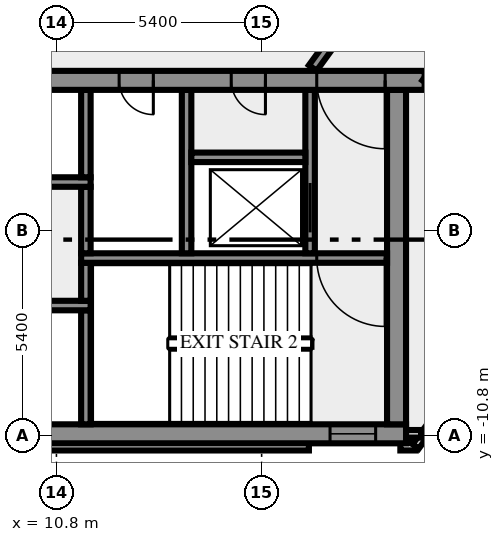
"""IFC4 building model, lengths in metres.
Left out: names, types, materials, properties, quantities, classifications, styles, units other than length and angle.
Written with IfcOpenShell. Run it as: python <this file> out.ifc"""

import sys

from ifc_helpers import new_model, si_unit, direction, frame, frame_2d, origin, place, context, subcontext, project, spatial, rectangle, extrude, element, fill, save


model = new_model("IFC4")
c1 = context("Model", 3, precision=1e-05, world=origin(), true_north=direction((0.0, 1.0)))
c2 = subcontext(c1, "Body", "Model", "MODEL_VIEW")
j1 = project(units=[si_unit("LENGTHUNIT", "METRE"), si_unit("PLANEANGLEUNIT", "RADIAN")], contexts=[c1])
p1 = place(None, origin())
s1 = spatial("IfcSite", under=j1, at=p1, CompositionType="ELEMENT")
p2 = place(p1, origin())
s2 = spatial("IfcBuilding", under=s1, at=p2, CompositionType="ELEMENT")
p3 = place(p2, frame((0.0, 0.0, 20.5)))
s3 = spatial("IfcBuildingStorey", under=s2, at=p3, CompositionType="ELEMENT", Elevation=20.5)
p4 = place(p3, frame((-17.444, -11.088, 0.0), z_axis=(0.0, 0.0, 1.0), x_axis=(1.0, 0.0, 0.0)))
e1 = element("IfcWall", 1, at=p4, inside=s3, PredefinedType="SOLIDWALL", context=c2, shape_type="SweptSolid", body=[
    extrude(rectangle(XDim=34.888, YDim=0.2, at=frame_2d((17.444, 0.0))), origin(), (0.0, 0.0, 1.0), 3.9),
])
p5 = place(p3, frame((19.85, -11.088, 0.0), z_axis=(0.0, 0.0, 1.0), x_axis=(1.0, 0.0, 0.0)))
e2 = element("IfcWall", 2, at=p5, inside=s3, PredefinedType="SOLIDWALL", context=c2, shape_type="SweptSolid", body=[
    extrude(rectangle(XDim=0.406, YDim=0.2, at=frame_2d((0.203, 0.0))), origin(), (0.0, 0.0, 1.0), 3.9),
])
p6 = place(p3, frame((20.253, -11.083, 0.0), z_axis=(0.0, 0.0, 1.0), x_axis=(0.587766567315, 0.809030569476, 0.0)))
e3 = element("IfcWall", 3, at=p6, inside=s3, PredefinedType="SOLIDWALL", context=c2, shape_type="SweptSolid", body=[
    extrude(rectangle(XDim=2.688, YDim=0.2, at=frame_2d((1.344, 0.0))), origin(), (0.0, 0.0, 1.0), 3.9),
])
p7 = place(p3, frame((19.98, -10.75, 0.0), z_axis=(0.0, 0.0, 1.0), x_axis=(1.0, 0.0, 0.0)))
e4 = element("IfcWall", 4, at=p7, inside=s3, PredefinedType="SOLIDWALL", context=c2, shape_type="SweptSolid", body=[
    extrude(rectangle(XDim=0.417, YDim=0.2, at=frame_2d((0.208, 0.0))), origin(), (0.0, 0.0, 1.0), 3.9),
])
p8 = place(p3, frame((-20.0, -10.75, 0.0), z_axis=(0.0, 0.0, 1.0), x_axis=(1.0, 0.0, 0.0)))
e5 = element("IfcWall", 5, at=p8, inside=s3, PredefinedType="SHEAR", context=c2, shape_type="SweptSolid", body=[
    extrude(rectangle(XDim=40.0, YDim=0.5, at=frame_2d((20.0, 0.0))), origin(), (0.0, 0.0, 1.0), 3.9),
])
p9 = place(p8, frame((0.8, 0.0, 1.0)))
e6 = element("IfcOpeningElement", 6, at=p9, cuts=e5, PredefinedType="OPENING", context=c2, shape_type="SweptSolid", body=[
    extrude(rectangle(XDim=1.2, YDim=1.2, at=frame_2d((0.6, 0.6))), frame((0.0, 0.26, 0.0), z_axis=(0.0, -1.0, 0.0), x_axis=(1.0, 0.0, 0.0)), (0.0, 0.0, 1.0), 0.52),
])
p10 = place(p8, frame((38.0, 0.0, 1.0)))
e7 = element("IfcOpeningElement", 7, at=p10, cuts=e5, PredefinedType="OPENING", context=c2, shape_type="SweptSolid", body=[
    extrude(rectangle(XDim=1.2, YDim=1.2, at=frame_2d((0.6, 0.6))), frame((0.0, 0.26, 0.0), z_axis=(0.0, -1.0, 0.0), x_axis=(1.0, 0.0, 0.0)), (0.0, 0.0, 1.0), 0.52),
])
p11 = place(p3, frame((11.575, -10.5, 0.0), z_axis=(0.0, 0.0, 1.0), x_axis=(0.0, 1.0, 0.0)))
e8 = element("IfcWall", 8, at=p11, inside=s3, PredefinedType="SHEAR", context=c2, shape_type="SweptSolid", body=[
    extrude(rectangle(XDim=3.0, YDim=0.25, at=frame_2d((1.5, 0.0))), origin(), (0.0, 0.0, 1.0), 3.9),
])
p12 = place(p3, frame((19.75, -10.5, 0.0), z_axis=(0.0, 0.0, 1.0), x_axis=(0.0, 1.0, 0.0)))
e9 = element("IfcWall", 9, at=p12, inside=s3, PredefinedType="SHEAR", context=c2, shape_type="SweptSolid", body=[
    extrude(rectangle(XDim=8.8, YDim=0.5, at=frame_2d((4.4, 0.0))), origin(), (0.0, 0.0, 1.0), 3.9),
])
p13 = place(p3, frame((11.7, -7.375, 0.0), z_axis=(0.0, 0.0, 1.0), x_axis=(-1.0, 0.0, 0.0)))
e10 = element("IfcWall", 10, at=p13, inside=s3, PredefinedType="SHEAR", context=c2, shape_type="SweptSolid", body=[
    extrude(rectangle(XDim=23.4, YDim=0.25, at=frame_2d((11.7, 0.0))), origin(), (0.0, 0.0, 1.0), 3.9),
])
p14 = place(p13, frame((21.45, 0.0, 0.0)))
e11 = element("IfcOpeningElement", 11, at=p14, cuts=e10, PredefinedType="OPENING", context=c2, shape_type="SweptSolid", body=[
    extrude(rectangle(XDim=1.1, YDim=2.1, at=frame_2d((0.55, 1.05))), frame((0.0, 0.135, 0.0), z_axis=(0.0, -1.0, 0.0), x_axis=(1.0, 0.0, 0.0)), (0.0, 0.0, 1.0), 0.27),
])
p15 = place(p13, frame((18.95, 0.0, 0.0)))
e12 = element("IfcOpeningElement", 12, at=p15, cuts=e10, PredefinedType="OPENING", context=c2, shape_type="SweptSolid", body=[
    extrude(rectangle(XDim=1.1, YDim=2.1, at=frame_2d((0.55, 1.05))), frame((0.0, 0.135, 0.0), z_axis=(0.0, -1.0, 0.0), x_axis=(1.0, 0.0, 0.0)), (0.0, 0.0, 1.0), 0.27),
])
p16 = place(p13, frame((16.45, 0.0, 0.0)))
e13 = element("IfcOpeningElement", 13, at=p16, cuts=e10, PredefinedType="OPENING", context=c2, shape_type="SweptSolid", body=[
    extrude(rectangle(XDim=1.1, YDim=2.1, at=frame_2d((0.55, 1.05))), frame((0.0, 0.135, 0.0), z_axis=(0.0, -1.0, 0.0), x_axis=(1.0, 0.0, 0.0)), (0.0, 0.0, 1.0), 0.27),
])
p17 = place(p13, frame((14.5, 0.0, 0.0)))
e14 = element("IfcOpeningElement", 14, at=p17, cuts=e10, PredefinedType="OPENING", context=c2, shape_type="SweptSolid", body=[
    extrude(rectangle(XDim=0.9, YDim=2.1, at=frame_2d((0.45, 1.05))), frame((0.0, 0.135, 0.0), z_axis=(0.0, -1.0, 0.0), x_axis=(1.0, 0.0, 0.0)), (0.0, 0.0, 1.0), 0.27),
])
p18 = place(p13, frame((12.95, 0.0, 0.0)))
e15 = element("IfcOpeningElement", 15, at=p18, cuts=e10, PredefinedType="OPENING", context=c2, shape_type="SweptSolid", body=[
    extrude(rectangle(XDim=0.9, YDim=2.1, at=frame_2d((0.45, 1.05))), frame((0.0, 0.135, 0.0), z_axis=(0.0, -1.0, 0.0), x_axis=(1.0, 0.0, 0.0)), (0.0, 0.0, 1.0), 0.27),
])
p19 = place(p13, frame((11.475, 0.0, 0.0)))
e16 = element("IfcOpeningElement", 16, at=p19, cuts=e10, PredefinedType="OPENING", context=c2, shape_type="SweptSolid", body=[
    extrude(rectangle(XDim=0.9, YDim=2.1, at=frame_2d((0.45, 1.05))), frame((0.0, 0.135, 0.0), z_axis=(0.0, -1.0, 0.0), x_axis=(1.0, 0.0, 0.0)), (0.0, 0.0, 1.0), 0.27),
])
p20 = place(p13, frame((10.45, 0.0, 0.0)))
e17 = element("IfcOpeningElement", 17, at=p20, cuts=e10, PredefinedType="OPENING", context=c2, shape_type="SweptSolid", body=[
    extrude(rectangle(XDim=0.5, YDim=2.1, at=frame_2d((0.25, 1.05))), frame((0.0, 0.135, 0.0), z_axis=(0.0, -1.0, 0.0), x_axis=(1.0, 0.0, 0.0)), (0.0, 0.0, 1.0), 0.27),
])
p21 = place(p3, frame((11.575, -7.25, 0.0), z_axis=(0.0, 0.0, 1.0), x_axis=(0.0, 1.0, 0.0)))
e18 = element("IfcWall", 18, at=p21, inside=s3, PredefinedType="SHEAR", context=c2, shape_type="SweptSolid", body=[
    extrude(rectangle(XDim=1.0, YDim=0.25, at=frame_2d((0.5, 0.0))), origin(), (0.0, 0.0, 1.0), 3.9),
])
p22 = place(p3, frame((19.5, -6.125, 0.0), z_axis=(0.0, 0.0, 1.0), x_axis=(-1.0, 0.0, 0.0)))
e19 = element("IfcWall", 19, at=p22, inside=s3, PredefinedType="SHEAR", context=c2, shape_type="SweptSolid", body=[
    extrude(rectangle(XDim=8.05, YDim=0.25, at=frame_2d((4.025, 0.0))), origin(), (0.0, 0.0, 1.0), 3.9),
])
p23 = place(p22, frame((0.05, 0.0, 0.0)))
e20 = element("IfcOpeningElement", 20, at=p23, cuts=e19, PredefinedType="OPENING", context=c2, shape_type="SweptSolid", body=[
    extrude(rectangle(XDim=1.8, YDim=2.1, at=frame_2d((0.9, 1.05))), frame((0.0, 0.135, 0.0), z_axis=(0.0, -1.0, 0.0), x_axis=(1.0, 0.0, 0.0)), (0.0, 0.0, 1.0), 0.27),
])
p24 = place(p3, frame((11.575, -6.0, 0.0), z_axis=(0.0, 0.0, 1.0), x_axis=(0.0, 1.0, 0.0)))
e21 = element("IfcWall", 21, at=p24, inside=s3, PredefinedType="SHEAR", context=c2, shape_type="SweptSolid", body=[
    extrude(rectangle(XDim=1.75, YDim=0.25, at=frame_2d((0.875, 0.0))), origin(), (0.0, 0.0, 1.0), 3.9),
])
p25 = place(p3, frame((14.225, -6.0, 0.0), z_axis=(0.0, 0.0, 1.0), x_axis=(0.0, 1.0, 0.0)))
e22 = element("IfcWall", 22, at=p25, inside=s3, PredefinedType="SHEAR", context=c2, shape_type="SweptSolid", body=[
    extrude(rectangle(XDim=4.3, YDim=0.25, at=frame_2d((2.15, 0.0))), origin(), (0.0, 0.0, 1.0), 3.9),
])
p26 = place(p3, frame((17.475, -6.0, 0.0), z_axis=(0.0, 0.0, 1.0), x_axis=(0.0, 1.0, 0.0)))
e23 = element("IfcWall", 23, at=p26, inside=s3, PredefinedType="SHEAR", context=c2, shape_type="SweptSolid", body=[
    extrude(rectangle(XDim=4.3, YDim=0.25, at=frame_2d((2.15, 0.0))), origin(), (0.0, 0.0, 1.0), 3.9),
])
p27 = place(p26, frame((0.55, 0.0, 0.0)))
e24 = element("IfcOpeningElement", 24, at=p27, cuts=e23, PredefinedType="OPENING", context=c2, shape_type="SweptSolid", body=[
    extrude(rectangle(XDim=1.3, YDim=2.1, at=frame_2d((0.65, 1.05))), frame((0.0, 0.135, 0.0), z_axis=(0.0, -1.0, 0.0), x_axis=(1.0, 0.0, 0.0)), (0.0, 0.0, 1.0), 0.27),
])
p28 = place(p3, frame((1.45, -4.125, 0.0), z_axis=(0.0, 0.0, 1.0), x_axis=(1.0, 0.0, 0.0)))
e25 = element("IfcWall", 25, at=p28, inside=s3, PredefinedType="SHEAR", context=c2, shape_type="SweptSolid", body=[
    extrude(rectangle(XDim=10.25, YDim=0.25, at=frame_2d((5.125, 0.0))), origin(), (0.0, 0.0, 1.0), 3.9),
])
p29 = place(p28, frame((0.7, 0.0, 0.0)))
e26 = element("IfcOpeningElement", 26, at=p29, cuts=e25, PredefinedType="OPENING", context=c2, shape_type="SweptSolid", body=[
    extrude(rectangle(XDim=1.3, YDim=2.1, at=frame_2d((0.65, 1.05))), frame((0.0, 0.135, 0.0), z_axis=(0.0, -1.0, 0.0), x_axis=(1.0, 0.0, 0.0)), (0.0, 0.0, 1.0), 0.27),
])
p30 = place(p3, frame((11.575, -4.0, 0.0), z_axis=(0.0, 0.0, 1.0), x_axis=(0.0, 1.0, 0.0)))
e27 = element("IfcWall", 27, at=p30, inside=s3, PredefinedType="SHEAR", context=c2, shape_type="SweptSolid", body=[
    extrude(rectangle(XDim=2.3, YDim=0.25, at=frame_2d((1.15, 0.0))), origin(), (0.0, 0.0, 1.0), 3.9),
])
p31 = place(p3, frame((14.35, -3.475, 0.0), z_axis=(0.0, 0.0, 1.0), x_axis=(1.0, 0.0, 0.0)))
e28 = element("IfcWall", 28, at=p31, inside=s3, PredefinedType="SHEAR", context=c2, shape_type="SweptSolid", body=[
    extrude(rectangle(XDim=3.0, YDim=0.25, at=frame_2d((1.5, 0.0))), origin(), (0.0, 0.0, 1.0), 3.9),
])
p32 = place(p3, frame((20.49, -1.45, 0.0), z_axis=(0.0, 0.0, 1.0), x_axis=(-1.0, 0.0, 0.0)))
e29 = element("IfcWall", 29, at=p32, inside=s3, PredefinedType="SHEAR", context=c2, shape_type="SweptSolid", body=[
    extrude(rectangle(XDim=40.98, YDim=0.5, at=frame_2d((20.49, 0.0))), origin(), (0.0, 0.0, 1.0), 3.9),
])
p33 = place(p32, frame((38.14, 0.0, 0.0)))
e30 = element("IfcOpeningElement", 30, at=p33, cuts=e29, PredefinedType="OPENING", context=c2, shape_type="SweptSolid", body=[
    extrude(rectangle(XDim=1.8, YDim=2.1, at=frame_2d((0.9, 1.05))), frame((0.0, 0.26, 0.0), z_axis=(0.0, -1.0, 0.0), x_axis=(1.0, 0.0, 0.0)), (0.0, 0.0, 1.0), 0.52),
])
p34 = place(p32, frame((36.728, 0.0, 0.0)))
e31 = element("IfcOpeningElement", 31, at=p34, cuts=e29, PredefinedType="OPENING", context=c2, shape_type="SweptSolid", body=[
    extrude(rectangle(XDim=0.8, YDim=2.1, at=frame_2d((0.4, 1.05))), frame((0.0, 0.26, 0.0), z_axis=(0.0, -1.0, 0.0), x_axis=(1.0, 0.0, 0.0)), (0.0, 0.0, 1.0), 0.52),
])
p35 = place(p32, frame((35.153, 0.0, 0.0)))
e32 = element("IfcOpeningElement", 32, at=p35, cuts=e29, PredefinedType="OPENING", context=c2, shape_type="SweptSolid", body=[
    extrude(rectangle(XDim=0.8, YDim=2.1, at=frame_2d((0.4, 1.05))), frame((0.0, 0.26, 0.0), z_axis=(0.0, -1.0, 0.0), x_axis=(1.0, 0.0, 0.0)), (0.0, 0.0, 1.0), 0.52),
])
p36 = place(p32, frame((32.94, 0.0, 0.0)))
e33 = element("IfcOpeningElement", 33, at=p36, cuts=e29, PredefinedType="OPENING", context=c2, shape_type="SweptSolid", body=[
    extrude(rectangle(XDim=0.9, YDim=2.1, at=frame_2d((0.45, 1.05))), frame((0.0, 0.26, 0.0), z_axis=(0.0, -1.0, 0.0), x_axis=(1.0, 0.0, 0.0)), (0.0, 0.0, 1.0), 0.52),
])
p37 = place(p32, frame((19.59, 0.0, 0.0)))
e34 = element("IfcOpeningElement", 34, at=p37, cuts=e29, PredefinedType="OPENING", context=c2, shape_type="SweptSolid", body=[
    extrude(rectangle(XDim=2.0, YDim=2.1, at=frame_2d((1.0, 1.05))), frame((0.0, 0.26, 0.0), z_axis=(0.0, -1.0, 0.0), x_axis=(1.0, 0.0, 0.0)), (0.0, 0.0, 1.0), 0.52),
])
p38 = place(p32, frame((7.14, 0.0, 0.0)))
e35 = element("IfcOpeningElement", 35, at=p38, cuts=e29, PredefinedType="OPENING", context=c2, shape_type="SweptSolid", body=[
    extrude(rectangle(XDim=0.9, YDim=2.1, at=frame_2d((0.45, 1.05))), frame((0.0, 0.26, 0.0), z_axis=(0.0, -1.0, 0.0), x_axis=(1.0, 0.0, 0.0)), (0.0, 0.0, 1.0), 0.52),
])
p39 = place(p32, frame((4.19, 0.0, 0.0)))
e36 = element("IfcOpeningElement", 36, at=p39, cuts=e29, PredefinedType="OPENING", context=c2, shape_type="SweptSolid", body=[
    extrude(rectangle(XDim=0.9, YDim=2.1, at=frame_2d((0.45, 1.05))), frame((0.0, 0.26, 0.0), z_axis=(0.0, -1.0, 0.0), x_axis=(1.0, 0.0, 0.0)), (0.0, 0.0, 1.0), 0.52),
])
p40 = place(p32, frame((1.04, 0.0, 0.0)))
e37 = element("IfcOpeningElement", 37, at=p40, cuts=e29, PredefinedType="OPENING", context=c2, shape_type="SweptSolid", body=[
    extrude(rectangle(XDim=1.8, YDim=2.1, at=frame_2d((0.9, 1.05))), frame((0.0, 0.26, 0.0), z_axis=(0.0, -1.0, 0.0), x_axis=(1.0, 0.0, 0.0)), (0.0, 0.0, 1.0), 0.52),
])
p41 = place(p3, frame((49.869, 38.856, 0.0), z_axis=(0.0, 0.0, 1.0), x_axis=(-0.587784522481, -0.809017524614, 0.0)))
e38 = element("IfcWall", 38, at=p41, inside=s3, PredefinedType="SOLIDWALL", context=c2, shape_type="SweptSolid", body=[
    extrude(rectangle(XDim=49.912, YDim=0.25, at=frame_2d((24.956, 0.0))), origin(), (0.0, 0.0, 1.0), 3.9),
])
p42 = place(p41, frame((27.946, 0.0, 0.0)))
e39 = element("IfcOpeningElement", 39, at=p42, cuts=e38, PredefinedType="OPENING", context=c2, shape_type="SweptSolid", body=[
    extrude(rectangle(XDim=0.9, YDim=2.1, at=frame_2d((0.45, 1.05))), frame((0.0, 0.135, 0.0), z_axis=(0.0, -1.0, 0.0), x_axis=(1.0, 0.0, 0.0)), (0.0, 0.0, 1.0), 0.27),
])
p43 = place(p41, frame((34.697, 0.0, 0.0)))
e40 = element("IfcOpeningElement", 40, at=p43, cuts=e38, PredefinedType="OPENING", context=c2, shape_type="SweptSolid", body=[
    extrude(rectangle(XDim=1.0, YDim=2.1, at=frame_2d((0.5, 1.05))), frame((0.0, 0.135, 0.0), z_axis=(0.0, -1.0, 0.0), x_axis=(1.0, 0.0, 0.0)), (0.0, 0.0, 1.0), 0.27),
])
p44 = place(p41, frame((15.797, 0.0, 0.0)))
e41 = element("IfcOpeningElement", 41, at=p44, cuts=e38, PredefinedType="OPENING", context=c2, shape_type="SweptSolid", body=[
    extrude(rectangle(XDim=0.9, YDim=2.1, at=frame_2d((0.45, 1.05))), frame((0.0, 0.135, 0.0), z_axis=(0.0, -1.0, 0.0), x_axis=(1.0, 0.0, 0.0)), (0.0, 0.0, 1.0), 0.27),
])
p45 = place(p41, frame((14.196, 0.0, 0.0)))
e42 = element("IfcOpeningElement", 42, at=p45, cuts=e38, PredefinedType="OPENING", context=c2, shape_type="SweptSolid", body=[
    extrude(rectangle(XDim=0.9, YDim=2.1, at=frame_2d((0.45, 1.05))), frame((0.0, 0.135, 0.0), z_axis=(0.0, -1.0, 0.0), x_axis=(1.0, 0.0, 0.0)), (0.0, 0.0, 1.0), 0.27),
])
p46 = place(p3, frame((17.545, -1.125, 0.0), z_axis=(0.0, 0.0, 1.0), x_axis=(0.587786323093, 0.809016216391, 0.0)))
e43 = element("IfcWall", 43, at=p46, inside=s3, PredefinedType="SOLIDWALL", context=c2, shape_type="SweptSolid", body=[
    extrude(rectangle(XDim=33.493, YDim=0.25, at=frame_2d((16.747, 0.0))), origin(), (0.0, 0.0, 1.0), 3.9),
])
p47 = place(p46, frame((24.508, 0.0, 0.0)))
e44 = element("IfcOpeningElement", 44, at=p47, cuts=e43, PredefinedType="OPENING", context=c2, shape_type="SweptSolid", body=[
    extrude(rectangle(XDim=0.9, YDim=2.1, at=frame_2d((0.45, 1.05))), frame((0.0, 0.135, 0.0), z_axis=(0.0, -1.0, 0.0), x_axis=(1.0, 0.0, 0.0)), (0.0, 0.0, 1.0), 0.27),
])
p48 = place(p46, frame((12.724, 0.0, 0.0)))
e45 = element("IfcOpeningElement", 45, at=p48, cuts=e43, PredefinedType="OPENING", context=c2, shape_type="SweptSolid", body=[
    extrude(rectangle(XDim=1.8, YDim=2.1, at=frame_2d((0.9, 1.05))), frame((0.0, 0.135, 0.0), z_axis=(0.0, -1.0, 0.0), x_axis=(1.0, 0.0, 0.0)), (0.0, 0.0, 1.0), 0.27),
])
p49 = place(p10, origin())
e46 = element("IfcWindow", 46, at=p49, inside=s3, PartitioningType="SINGLE_PANEL", PredefinedType="WINDOW", context=c2, shape_type="SweptSolid", body=[
    extrude(rectangle(XDim=1.2, YDim=1.2, at=frame_2d((0.6, 0.6))), frame((0.0, 0.03, 0.0), z_axis=(0.0, -1.0, 0.0), x_axis=(1.0, 0.0, 0.0)), (0.0, 0.0, 1.0), 0.06),
])
fill(e7, e46)
p50 = place(p23, origin())
e47 = element("IfcDoor", 47, at=p50, inside=s3, OperationType="DOUBLE_DOOR_SINGLE_SWING", PredefinedType="DOOR", context=c2, shape_type="SweptSolid", body=[
    extrude(rectangle(XDim=1.8, YDim=2.1, at=frame_2d((0.9, 1.05))), frame((0.0, 0.025, 0.0), z_axis=(0.0, -1.0, 0.0), x_axis=(1.0, 0.0, 0.0)), (0.0, 0.0, 1.0), 0.05),
])
fill(e20, e47)
p51 = place(p27, origin())
e48 = element("IfcDoor", 48, at=p51, inside=s3, OperationType="DOUBLE_DOOR_SLIDING", PredefinedType="DOOR", context=c2, shape_type="SweptSolid", body=[
    extrude(rectangle(XDim=1.3, YDim=2.1, at=frame_2d((0.65, 1.05))), frame((0.0, 0.025, 0.0), z_axis=(0.0, -1.0, 0.0), x_axis=(1.0, 0.0, 0.0)), (0.0, 0.0, 1.0), 0.05),
])
fill(e24, e48)
p52 = place(p38, origin())
e49 = element("IfcDoor", 49, at=p52, inside=s3, OperationType="SINGLE_SWING_LEFT", PredefinedType="DOOR", context=c2, shape_type="SweptSolid", body=[
    extrude(rectangle(XDim=0.9, YDim=2.1, at=frame_2d((0.45, 1.05))), frame((0.0, 0.025, 0.0), z_axis=(0.0, -1.0, 0.0), x_axis=(1.0, 0.0, 0.0)), (0.0, 0.0, 1.0), 0.05),
])
fill(e35, e49)
p53 = place(p39, origin())
e50 = element("IfcDoor", 50, at=p53, inside=s3, OperationType="SINGLE_SWING_LEFT", PredefinedType="DOOR", context=c2, shape_type="SweptSolid", body=[
    extrude(rectangle(XDim=0.9, YDim=2.1, at=frame_2d((0.45, 1.05))), frame((0.0, 0.025, 0.0), z_axis=(0.0, -1.0, 0.0), x_axis=(1.0, 0.0, 0.0)), (0.0, 0.0, 1.0), 0.05),
])
fill(e36, e50)
p54 = place(p40, origin())
e51 = element("IfcDoor", 51, at=p54, inside=s3, OperationType="DOUBLE_DOOR_SINGLE_SWING", PredefinedType="DOOR", context=c2, shape_type="SweptSolid", body=[
    extrude(rectangle(XDim=1.8, YDim=2.1, at=frame_2d((0.9, 1.05))), frame((0.0, 0.025, 0.0), z_axis=(0.0, -1.0, 0.0), x_axis=(1.0, 0.0, 0.0)), (0.0, 0.0, 1.0), 0.05),
])
fill(e37, e51)
save(model, sys.argv[1])
